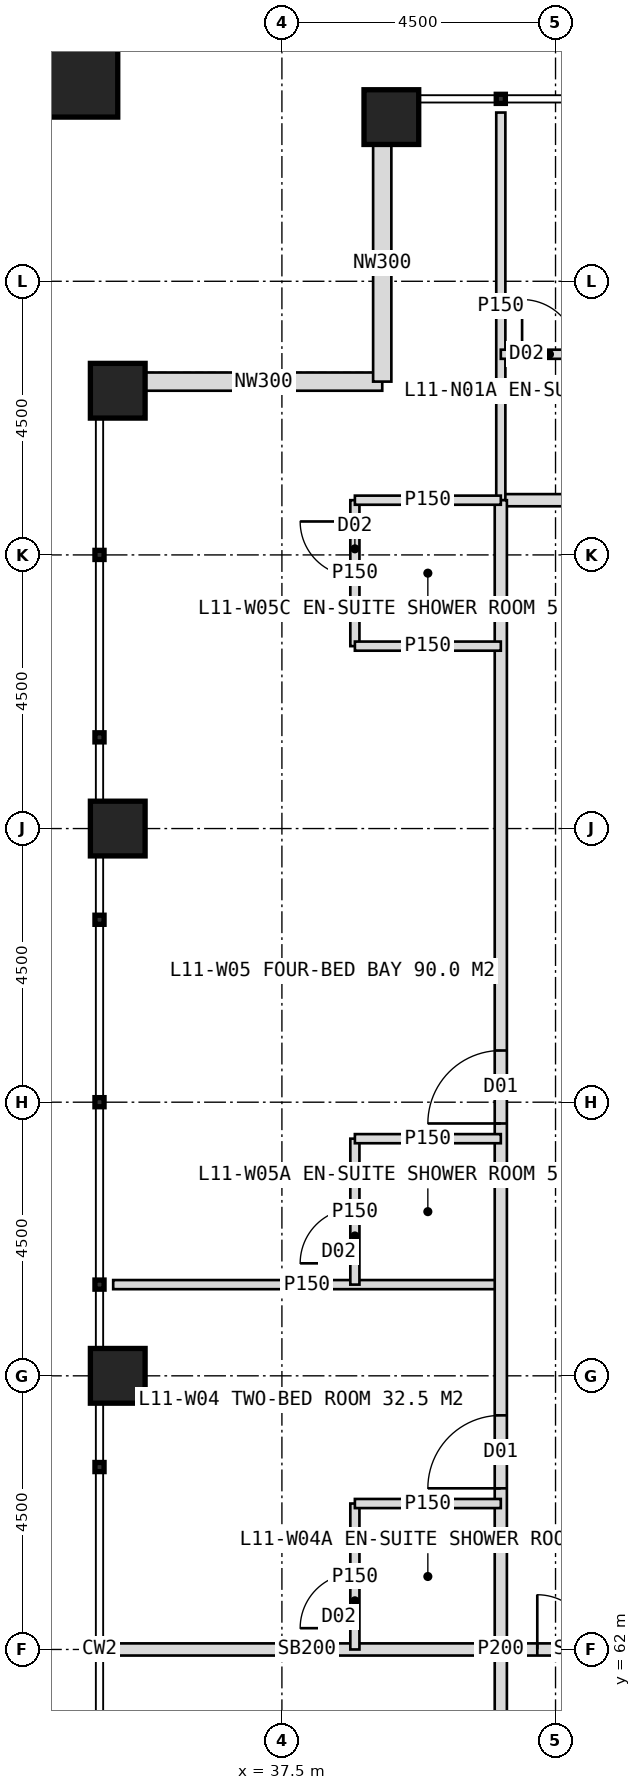
"""IFC4 building model, lengths in metres.
Left out: names, types, materials, properties, quantities, classifications, styles, units other than length and angle.
Written with IfcOpenShell. Run it as: python <this file> out.ifc"""

import sys

from ifc_helpers import new_model, si_unit, direction, frame, frame_2d, origin, origin_2d, place, context, subcontext, project, spatial, rectangle, hollow_rectangle, extrude, element, fill, save


model = new_model("IFC4")
c1 = context("Model", 3, precision=1e-05, world=origin(), true_north=direction((0.0, 1.0)))
c2 = subcontext(c1, "Body", "Model", "MODEL_VIEW")
j1 = project(units=[si_unit("LENGTHUNIT", "METRE"), si_unit("PLANEANGLEUNIT", "RADIAN")], contexts=[c1])
p1 = place(None, origin())
s1 = spatial("IfcSite", under=j1, at=p1, CompositionType="ELEMENT")
p2 = place(p1, origin())
s2 = spatial("IfcBuilding", under=s1, at=p2, CompositionType="ELEMENT")
p3 = place(p2, frame((0.0, 0.0, 51.0)))
s3 = spatial("IfcBuildingStorey", under=s2, at=p3, CompositionType="ELEMENT", Elevation=51.0)
for number, where, z_axis, x_axis in (
    (1, (39.3, 87.2, 0.0), (0.0, 0.0, 1.0), (1.0, 0.0, 0.0)),
    (2, (34.8, 66.5, 0.0), (0.0, 0.0, 1.0), (1.0, 0.0, 0.0)),
    (3, (34.8, 75.5, 0.0), (0.0, 0.0, 1.0), (1.0, 0.0, 0.0)),
    (4, (34.8, 82.7, 0.0), (0.0, 0.0, 1.0), (1.0, 0.0, 0.0)),
):
    element("IfcColumn", number, at=place(p3, frame(where, z_axis=z_axis, x_axis=x_axis)), inside=s3, PredefinedType="COLUMN", context=c2, shape_type="SweptSolid", body=[
        extrude(hollow_rectangle(XDim=0.9, YDim=0.9, WallThickness=0.08, at=origin_2d()), origin(), (0.0, 0.0, 1.0), 4.0),
    ])
p4 = place(p3, frame((33.9, 88.1, 0.0), z_axis=(0.0, 0.0, 1.0), x_axis=(1.0, 0.0, 0.0)))
e5 = element("IfcColumn", 5, at=p4, inside=s3, PredefinedType="COLUMN", context=c2, shape_type="SweptSolid", body=[
    extrude(hollow_rectangle(XDim=1.8, YDim=1.8, WallThickness=0.1, at=origin_2d()), origin(), (0.0, 0.0, 1.0), 4.0),
])
for number, where, z_axis, x_axis in (
    (6, (35.25, 82.85, 0.0), (0.0, 0.0, 1.0), (1.0, 0.0, 0.0)),
    (7, (39.15, 82.85, 0.0), (0.0, 0.0, 1.0), (0.0, 1.0, 0.0)),
):
    element("IfcWall", number, at=place(p3, frame(where, z_axis=z_axis, x_axis=x_axis)), inside=s3, PredefinedType="ELEMENTEDWALL", context=c2, shape_type="SweptSolid", body=[
        extrude(rectangle(XDim=3.9, YDim=0.3, at=frame_2d((1.95, 0.0))), origin(), (0.0, 0.0, 1.0), 2.95),
    ])
p5 = place(p3, frame((41.1, 80.9, 0.0), z_axis=(0.0, 0.0, 1.0), x_axis=(1.0, 0.0, 0.0)))
e8 = element("IfcWall", 8, at=p5, inside=s3, PredefinedType="PARTITIONING", context=c2, shape_type="SweptSolid", body=[
    extrude(rectangle(XDim=37.8, YDim=0.2, at=frame_2d((18.9, 0.0))), origin(), (0.0, 0.0, 1.0), 3.75),
])
p6 = place(p5, frame((3.25, 0.0, 0.0)))
e9 = element("IfcOpeningElement", 9, at=p6, cuts=e8, PredefinedType="OPENING", context=c2, shape_type="SweptSolid", body=[
    extrude(rectangle(XDim=1.2, YDim=2.2, at=frame_2d((0.6, 1.1))), frame((0.0, 0.11, 0.0), z_axis=(0.0, -1.0, 0.0), x_axis=(1.0, 0.0, 0.0)), (0.0, 0.0, 1.0), 0.22),
])
p7 = place(p5, frame((9.55, 0.0, 0.0)))
e10 = element("IfcOpeningElement", 10, at=p7, cuts=e8, PredefinedType="OPENING", context=c2, shape_type="SweptSolid", body=[
    extrude(rectangle(XDim=1.2, YDim=2.2, at=frame_2d((0.6, 1.1))), frame((0.0, 0.11, 0.0), z_axis=(0.0, -1.0, 0.0), x_axis=(1.0, 0.0, 0.0)), (0.0, 0.0, 1.0), 0.22),
])
p8 = place(p5, frame((15.55, 0.0, 0.0)))
e11 = element("IfcOpeningElement", 11, at=p8, cuts=e8, PredefinedType="OPENING", context=c2, shape_type="SweptSolid", body=[
    extrude(rectangle(XDim=1.2, YDim=2.2, at=frame_2d((0.6, 1.1))), frame((0.0, 0.11, 0.0), z_axis=(0.0, -1.0, 0.0), x_axis=(1.0, 0.0, 0.0)), (0.0, 0.0, 1.0), 0.22),
])
p9 = place(p5, frame((21.4, 0.0, 0.0)))
e12 = element("IfcOpeningElement", 12, at=p9, cuts=e8, PredefinedType="OPENING", context=c2, shape_type="SweptSolid", body=[
    extrude(rectangle(XDim=1.0, YDim=2.1, at=frame_2d((0.5, 1.05))), frame((0.0, 0.11, 0.0), z_axis=(0.0, -1.0, 0.0), x_axis=(1.0, 0.0, 0.0)), (0.0, 0.0, 1.0), 0.22),
])
p10 = place(p5, frame((27.55, 0.0, 0.0)))
e13 = element("IfcOpeningElement", 13, at=p10, cuts=e8, PredefinedType="OPENING", context=c2, shape_type="SweptSolid", body=[
    extrude(rectangle(XDim=1.2, YDim=2.2, at=frame_2d((0.6, 1.1))), frame((0.0, 0.11, 0.0), z_axis=(0.0, -1.0, 0.0), x_axis=(1.0, 0.0, 0.0)), (0.0, 0.0, 1.0), 0.22),
])
p11 = place(p3, frame((41.1, 80.9, 0.0), z_axis=(0.0, 0.0, 1.0), x_axis=(0.0, 1.0, 0.0)))
e14 = element("IfcWall", 14, at=p11, inside=s3, PredefinedType="PARTITIONING", context=c2, shape_type="SweptSolid", body=[
    extrude(rectangle(XDim=6.375, YDim=0.15, at=frame_2d((3.188, 0.0))), origin(), (0.0, 0.0, 1.0), 3.75),
])
p12 = place(p3, frame((41.1, 83.3, 0.0), z_axis=(0.0, 0.0, 1.0), x_axis=(1.0, 0.0, 0.0)))
e15 = element("IfcWall", 15, at=p12, inside=s3, PredefinedType="PARTITIONING", context=c2, shape_type="SweptSolid", body=[
    extrude(rectangle(XDim=3.0, YDim=0.15, at=frame_2d((1.5, 0.0))), origin(), (0.0, 0.0, 1.0), 3.75),
])
p13 = place(p12, frame((0.35, 0.0, 0.0)))
e16 = element("IfcOpeningElement", 16, at=p13, cuts=e15, PredefinedType="OPENING", context=c2, shape_type="SweptSolid", body=[
    extrude(rectangle(XDim=0.9, YDim=2.1, at=frame_2d((0.45, 1.05))), frame((0.0, 0.085, 0.0), z_axis=(0.0, -1.0, 0.0), x_axis=(1.0, 0.0, 0.0)), (0.0, 0.0, 1.0), 0.17),
])
p14 = place(p3, frame((41.1, 62.0, 0.0), z_axis=(0.0, 0.0, 1.0), x_axis=(-1.0, 0.0, 0.0)))
e17 = element("IfcWall", 17, at=p14, inside=s3, PredefinedType="SOLIDWALL", context=c2, shape_type="SweptSolid", body=[
    extrude(rectangle(XDim=6.375, YDim=0.2, at=frame_2d((3.188, 0.0))), origin(), (0.0, 0.0, 1.0), 2.75),
])
p15 = place(p3, frame((41.1, 68.0, 0.0), z_axis=(0.0, 0.0, 1.0), x_axis=(-1.0, 0.0, 0.0)))
e18 = element("IfcWall", 18, at=p15, inside=s3, PredefinedType="PARTITIONING", context=c2, shape_type="SweptSolid", body=[
    extrude(rectangle(XDim=6.375, YDim=0.15, at=frame_2d((3.188, 0.0))), origin(), (0.0, 0.0, 1.0), 3.75),
])
p16 = place(p3, frame((41.1, 43.1, 0.0), z_axis=(0.0, 0.0, 1.0), x_axis=(0.0, 1.0, 0.0)))
e19 = element("IfcWall", 19, at=p16, inside=s3, PredefinedType="PARTITIONING", context=c2, shape_type="SweptSolid", body=[
    extrude(rectangle(XDim=37.8, YDim=0.2, at=frame_2d((18.9, 0.0))), origin(), (0.0, 0.0, 1.0), 3.75),
])
p17 = place(p16, frame((3.25, 0.0, 0.0)))
e20 = element("IfcOpeningElement", 20, at=p17, cuts=e19, PredefinedType="OPENING", context=c2, shape_type="SweptSolid", body=[
    extrude(rectangle(XDim=1.2, YDim=2.2, at=frame_2d((0.6, 1.1))), frame((0.0, 0.11, 0.0), z_axis=(0.0, -1.0, 0.0), x_axis=(1.0, 0.0, 0.0)), (0.0, 0.0, 1.0), 0.22),
])
p18 = place(p16, frame((9.55, 0.0, 0.0)))
e21 = element("IfcOpeningElement", 21, at=p18, cuts=e19, PredefinedType="OPENING", context=c2, shape_type="SweptSolid", body=[
    extrude(rectangle(XDim=1.2, YDim=2.2, at=frame_2d((0.6, 1.1))), frame((0.0, 0.11, 0.0), z_axis=(0.0, -1.0, 0.0), x_axis=(1.0, 0.0, 0.0)), (0.0, 0.0, 1.0), 0.22),
])
p19 = place(p16, frame((15.55, 0.0, 0.0)))
e22 = element("IfcOpeningElement", 22, at=p19, cuts=e19, PredefinedType="OPENING", context=c2, shape_type="SweptSolid", body=[
    extrude(rectangle(XDim=1.2, YDim=2.2, at=frame_2d((0.6, 1.1))), frame((0.0, 0.11, 0.0), z_axis=(0.0, -1.0, 0.0), x_axis=(1.0, 0.0, 0.0)), (0.0, 0.0, 1.0), 0.22),
])
p20 = place(p16, frame((21.55, 0.0, 0.0)))
e23 = element("IfcOpeningElement", 23, at=p20, cuts=e19, PredefinedType="OPENING", context=c2, shape_type="SweptSolid", body=[
    extrude(rectangle(XDim=1.2, YDim=2.2, at=frame_2d((0.6, 1.1))), frame((0.0, 0.11, 0.0), z_axis=(0.0, -1.0, 0.0), x_axis=(1.0, 0.0, 0.0)), (0.0, 0.0, 1.0), 0.22),
])
p21 = place(p16, frame((27.55, 0.0, 0.0)))
e24 = element("IfcOpeningElement", 24, at=p21, cuts=e19, PredefinedType="OPENING", context=c2, shape_type="SweptSolid", body=[
    extrude(rectangle(XDim=1.2, YDim=2.2, at=frame_2d((0.6, 1.1))), frame((0.0, 0.11, 0.0), z_axis=(0.0, -1.0, 0.0), x_axis=(1.0, 0.0, 0.0)), (0.0, 0.0, 1.0), 0.22),
])
p22 = place(p3, frame((38.7, 62.0, 0.0), z_axis=(0.0, 0.0, 1.0), x_axis=(0.0, 1.0, 0.0)))
e25 = element("IfcWall", 25, at=p22, inside=s3, PredefinedType="PARTITIONING", context=c2, shape_type="SweptSolid", body=[
    extrude(rectangle(XDim=2.4, YDim=0.15, at=frame_2d((1.2, 0.0))), origin(), (0.0, 0.0, 1.0), 3.75),
])
p23 = place(p22, frame((0.35, 0.0, 0.0)))
e26 = element("IfcOpeningElement", 26, at=p23, cuts=e25, PredefinedType="OPENING", context=c2, shape_type="SweptSolid", body=[
    extrude(rectangle(XDim=0.9, YDim=2.1, at=frame_2d((0.45, 1.05))), frame((0.0, 0.085, 0.0), z_axis=(0.0, -1.0, 0.0), x_axis=(1.0, 0.0, 0.0)), (0.0, 0.0, 1.0), 0.17),
])
p24 = place(p3, frame((41.1, 64.4, 0.0), z_axis=(0.0, 0.0, 1.0), x_axis=(-1.0, 0.0, 0.0)))
e27 = element("IfcWall", 27, at=p24, inside=s3, PredefinedType="PARTITIONING", context=c2, shape_type="SweptSolid", body=[
    extrude(rectangle(XDim=2.4, YDim=0.15, at=frame_2d((1.2, 0.0))), origin(), (0.0, 0.0, 1.0), 3.75),
])
p25 = place(p3, frame((38.7, 68.0, 0.0), z_axis=(0.0, 0.0, 1.0), x_axis=(0.0, 1.0, 0.0)))
e28 = element("IfcWall", 28, at=p25, inside=s3, PredefinedType="PARTITIONING", context=c2, shape_type="SweptSolid", body=[
    extrude(rectangle(XDim=2.4, YDim=0.15, at=frame_2d((1.2, 0.0))), origin(), (0.0, 0.0, 1.0), 3.75),
])
p26 = place(p25, frame((0.35, 0.0, 0.0)))
e29 = element("IfcOpeningElement", 29, at=p26, cuts=e28, PredefinedType="OPENING", context=c2, shape_type="SweptSolid", body=[
    extrude(rectangle(XDim=0.9, YDim=2.1, at=frame_2d((0.45, 1.05))), frame((0.0, 0.085, 0.0), z_axis=(0.0, -1.0, 0.0), x_axis=(1.0, 0.0, 0.0)), (0.0, 0.0, 1.0), 0.17),
])
p27 = place(p3, frame((41.1, 70.4, 0.0), z_axis=(0.0, 0.0, 1.0), x_axis=(-1.0, 0.0, 0.0)))
e30 = element("IfcWall", 30, at=p27, inside=s3, PredefinedType="PARTITIONING", context=c2, shape_type="SweptSolid", body=[
    extrude(rectangle(XDim=2.4, YDim=0.15, at=frame_2d((1.2, 0.0))), origin(), (0.0, 0.0, 1.0), 3.75),
])
p28 = place(p3, frame((38.7, 78.5, 0.0), z_axis=(0.0, 0.0, 1.0), x_axis=(0.0, 1.0, 0.0)))
e31 = element("IfcWall", 31, at=p28, inside=s3, PredefinedType="PARTITIONING", context=c2, shape_type="SweptSolid", body=[
    extrude(rectangle(XDim=2.4, YDim=0.15, at=frame_2d((1.2, 0.0))), origin(), (0.0, 0.0, 1.0), 3.75),
])
p29 = place(p28, frame((1.15, 0.0, 0.0)))
e32 = element("IfcOpeningElement", 32, at=p29, cuts=e31, PredefinedType="OPENING", context=c2, shape_type="SweptSolid", body=[
    extrude(rectangle(XDim=0.9, YDim=2.1, at=frame_2d((0.45, 1.05))), frame((0.0, 0.085, 0.0), z_axis=(0.0, -1.0, 0.0), x_axis=(1.0, 0.0, 0.0)), (0.0, 0.0, 1.0), 0.17),
])
for number, where, z_axis, x_axis in (
    (33, (41.1, 78.5, 0.0), (0.0, 0.0, 1.0), (-1.0, 0.0, 0.0)),
    (34, (41.1, 80.9, 0.0), (0.0, 0.0, 1.0), (-1.0, 0.0, 0.0)),
):
    element("IfcWall", number, at=place(p3, frame(where, z_axis=z_axis, x_axis=x_axis)), inside=s3, PredefinedType="PARTITIONING", context=c2, shape_type="SweptSolid", body=[
        extrude(rectangle(XDim=2.4, YDim=0.15, at=frame_2d((1.2, 0.0))), origin(), (0.0, 0.0, 1.0), 3.75),
    ])
p30 = place(p3, frame((43.8, 62.0, 0.0), z_axis=(0.0, 0.0, 1.0), x_axis=(-1.0, 0.0, 0.0)))
e35 = element("IfcWall", 35, at=p30, inside=s3, PredefinedType="SOLIDWALL", context=c2, shape_type="SweptSolid", body=[
    extrude(rectangle(XDim=2.7, YDim=0.2, at=frame_2d((1.35, 0.0))), origin(), (0.0, 0.0, 1.0), 2.75),
])
p31 = place(p30, frame((0.3, 0.0, 0.0)))
e36 = element("IfcOpeningElement", 36, at=p31, cuts=e35, PredefinedType="OPENING", context=c2, shape_type="SweptSolid", body=[
    extrude(rectangle(XDim=1.8, YDim=2.2, at=frame_2d((0.9, 1.1))), frame((0.0, 0.11, 0.0), z_axis=(0.0, -1.0, 0.0), x_axis=(1.0, 0.0, 0.0)), (0.0, 0.0, 1.0), 0.22),
])
p32 = place(p13, origin())
e37 = element("IfcDoor", 37, at=p32, inside=s3, OperationType="SINGLE_SWING_LEFT", PredefinedType="DOOR", context=c2, shape_type="SweptSolid", body=[
    extrude(rectangle(XDim=0.9, YDim=2.1, at=frame_2d((0.45, 1.05))), frame((0.0, 0.025, 0.0), z_axis=(0.0, -1.0, 0.0), x_axis=(1.0, 0.0, 0.0)), (0.0, 0.0, 1.0), 0.05),
])
fill(e16, e37)
p33 = place(p20, origin())
e38 = element("IfcDoor", 38, at=p33, inside=s3, OperationType="SINGLE_SWING_LEFT", PredefinedType="DOOR", context=c2, shape_type="SweptSolid", body=[
    extrude(rectangle(XDim=1.2, YDim=2.2, at=frame_2d((0.6, 1.1))), frame((0.0, 0.025, 0.0), z_axis=(0.0, -1.0, 0.0), x_axis=(1.0, 0.0, 0.0)), (0.0, 0.0, 1.0), 0.05),
])
fill(e23, e38)
p34 = place(p23, origin())
e39 = element("IfcDoor", 39, at=p34, inside=s3, OperationType="SINGLE_SWING_LEFT", PredefinedType="DOOR", context=c2, shape_type="SweptSolid", body=[
    extrude(rectangle(XDim=0.9, YDim=2.1, at=frame_2d((0.45, 1.05))), frame((0.0, 0.025, 0.0), z_axis=(0.0, -1.0, 0.0), x_axis=(1.0, 0.0, 0.0)), (0.0, 0.0, 1.0), 0.05),
])
fill(e26, e39)
p35 = place(p21, origin())
e40 = element("IfcDoor", 40, at=p35, inside=s3, OperationType="SINGLE_SWING_LEFT", PredefinedType="DOOR", context=c2, shape_type="SweptSolid", body=[
    extrude(rectangle(XDim=1.2, YDim=2.2, at=frame_2d((0.6, 1.1))), frame((0.0, 0.025, 0.0), z_axis=(0.0, -1.0, 0.0), x_axis=(1.0, 0.0, 0.0)), (0.0, 0.0, 1.0), 0.05),
])
fill(e24, e40)
p36 = place(p26, origin())
e41 = element("IfcDoor", 41, at=p36, inside=s3, OperationType="SINGLE_SWING_LEFT", PredefinedType="DOOR", context=c2, shape_type="SweptSolid", body=[
    extrude(rectangle(XDim=0.9, YDim=2.1, at=frame_2d((0.45, 1.05))), frame((0.0, 0.025, 0.0), z_axis=(0.0, -1.0, 0.0), x_axis=(1.0, 0.0, 0.0)), (0.0, 0.0, 1.0), 0.05),
])
fill(e29, e41)
p37 = place(p29, origin())
e42 = element("IfcDoor", 42, at=p37, inside=s3, OperationType="SINGLE_SWING_RIGHT", PredefinedType="DOOR", context=c2, shape_type="SweptSolid", body=[
    extrude(rectangle(XDim=0.9, YDim=2.1, at=frame_2d((0.45, 1.05))), frame((0.0, 0.025, 0.0), z_axis=(0.0, -1.0, 0.0), x_axis=(1.0, 0.0, 0.0)), (0.0, 0.0, 1.0), 0.05),
])
fill(e32, e42)
p38 = place(p31, origin())
e43 = element("IfcDoor", 43, at=p38, inside=s3, OperationType="DOUBLE_DOOR_DOUBLE_SWING", PredefinedType="DOOR", context=c2, shape_type="SweptSolid", body=[
    extrude(rectangle(XDim=1.8, YDim=2.2, at=frame_2d((0.9, 1.1))), frame((0.0, 0.025, 0.0), z_axis=(0.0, -1.0, 0.0), x_axis=(1.0, 0.0, 0.0)), (0.0, 0.0, 1.0), 0.05),
])
fill(e36, e43)
save(model, sys.argv[1])
